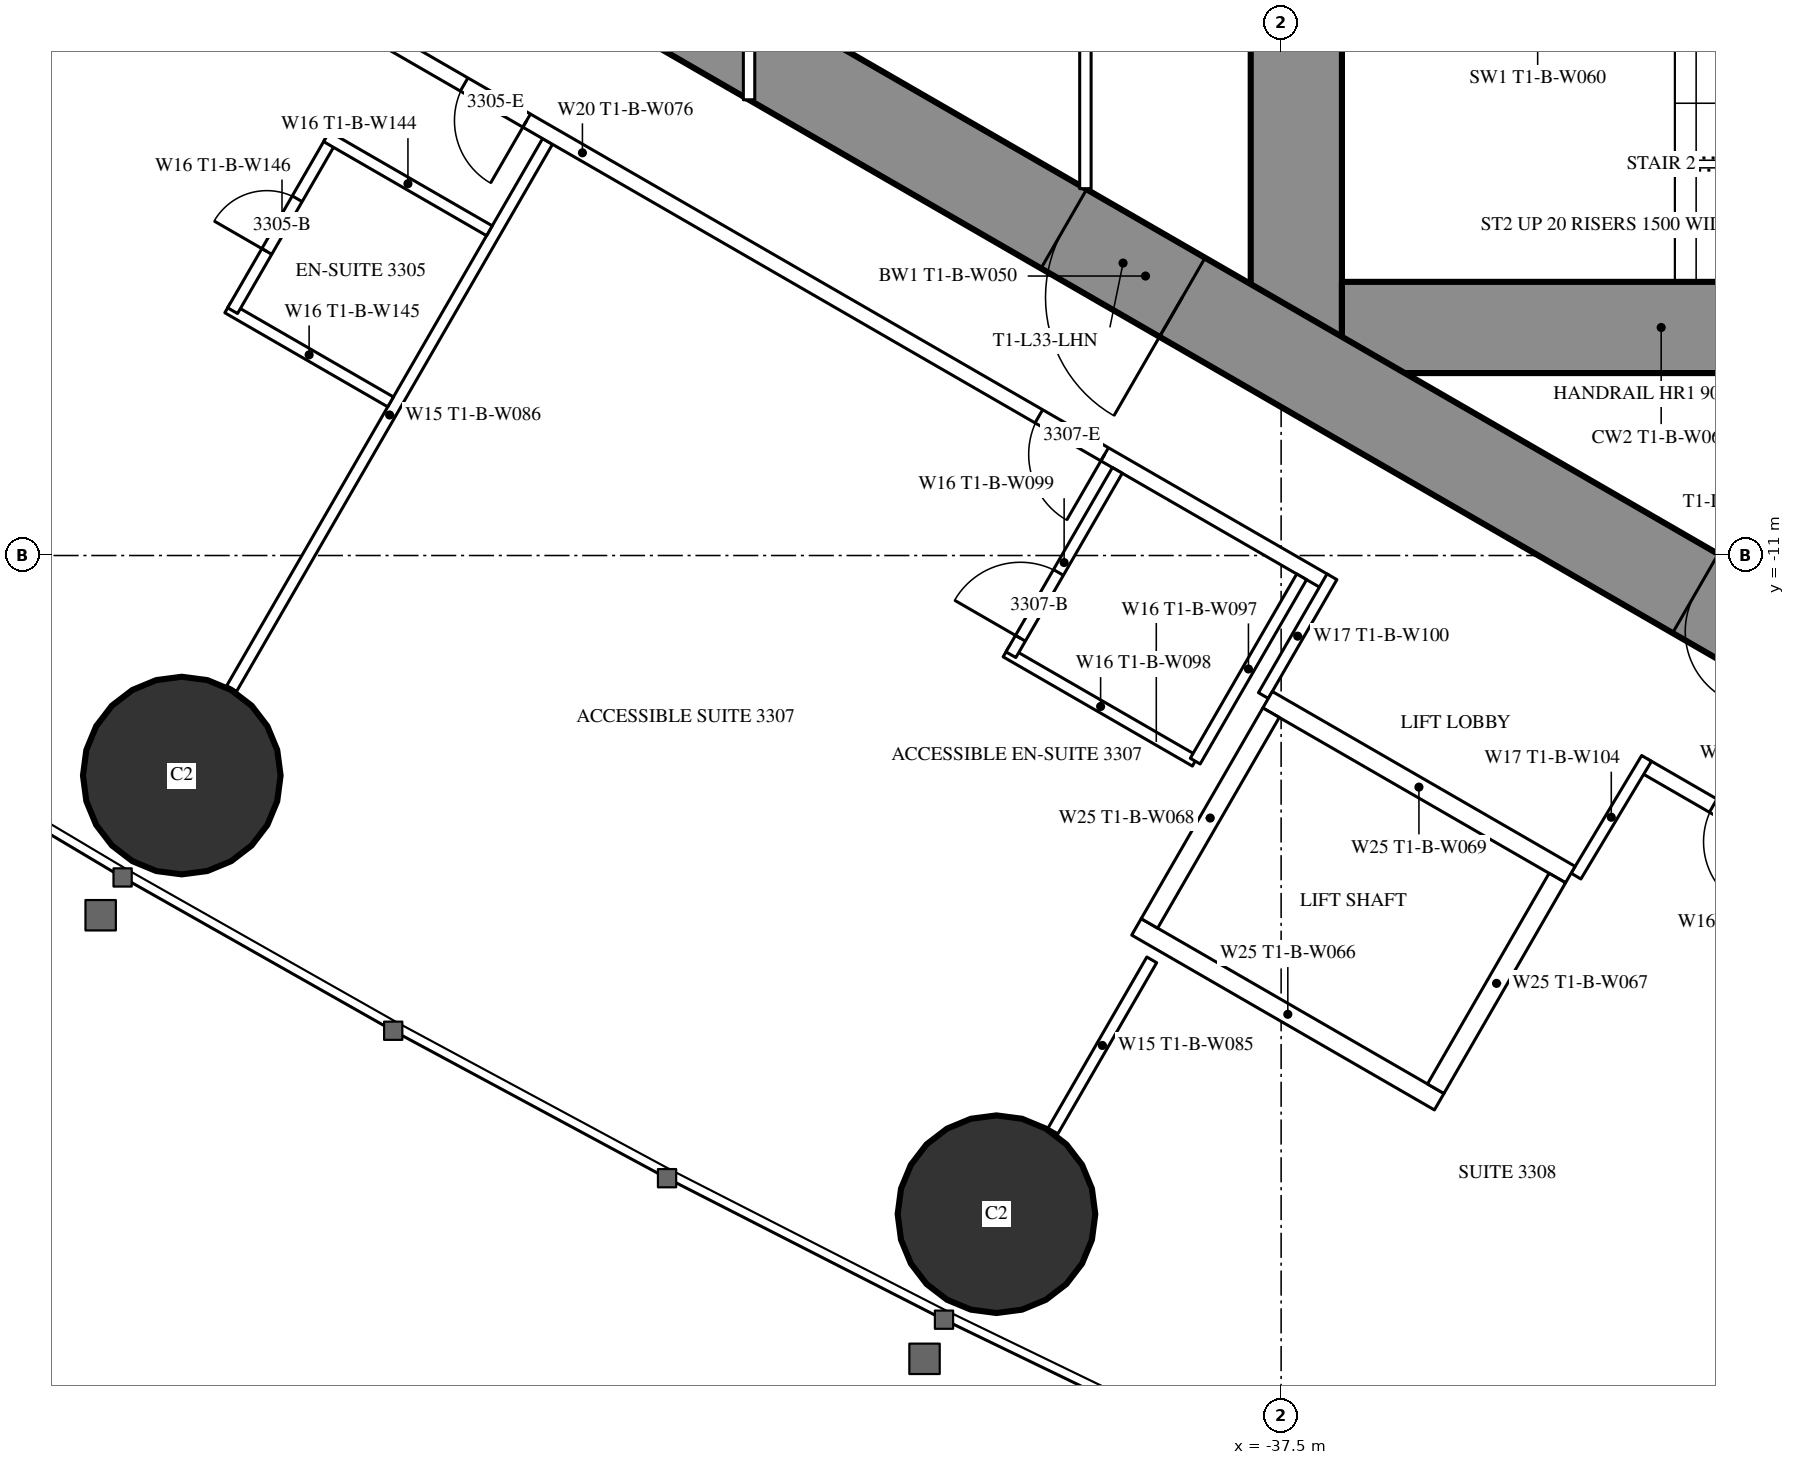
"""IFC4 building model, lengths in metres.
Left out: names, types, materials, properties, quantities, classifications, styles, units other than length and angle.
Written with IfcOpenShell. Run it as: python <this file> out.ifc"""

import sys

from ifc_helpers import new_model, si_unit, direction, frame, frame_2d, origin, origin_2d, place, context, subcontext, project, spatial, rectangle, hollow_circle, extrude, element, fill, save


model = new_model("IFC4")
c1 = context("Model", 3, precision=1e-05, world=origin(), true_north=direction((0.0, 1.0)))
c2 = subcontext(c1, "Body", "Model", "MODEL_VIEW")
j1 = project(units=[si_unit("LENGTHUNIT", "METRE"), si_unit("PLANEANGLEUNIT", "RADIAN")], contexts=[c1])
p1 = place(None, origin())
s1 = spatial("IfcSite", under=j1, at=p1, CompositionType="ELEMENT")
p2 = place(p1, origin())
s2 = spatial("IfcBuilding", under=s1, at=p2, CompositionType="ELEMENT")
p3 = place(p2, frame((0.0, 0.0, 125.6)))
s3 = spatial("IfcBuildingStorey", under=s2, at=p3, CompositionType="ELEMENT", Elevation=125.6)
for number, where, z_axis, x_axis in (
    (1, (-51.963, -13.895, 0.0), (0.0, 0.0, 1.0), (1.0, 0.0, 0.0)),
    (2, (-41.245, -19.666, 0.0), (0.0, 0.0, 1.0), (1.0, 0.0, 0.0)),
):
    element("IfcColumn", number, at=place(p3, frame(where, z_axis=z_axis, x_axis=x_axis)), inside=s3, PredefinedType="COLUMN", context=c2, shape_type="SweptSolid", body=[
        extrude(hollow_circle(Radius=1.3, WallThickness=0.1, at=origin_2d()), origin(), (0.0, 0.0, 1.0), 3.5),
    ])
p4 = place(p3, frame((-37.3, 8.6, 0.0), z_axis=(0.0, 0.0, 1.0), x_axis=(0.0, -1.0, 0.0)))
e3 = element("IfcWall", 3, at=p4, inside=s3, PredefinedType="SHEAR", context=c2, shape_type="SweptSolid", body=[
    extrude(rectangle(XDim=17.2, YDim=1.2, at=frame_2d((8.6, 0.0))), origin(), (0.0, 0.0, 1.0), 3.5),
])
p5 = place(p4, frame((7.7, 0.0, 0.0)))
e4 = element("IfcOpeningElement", 4, at=p5, cuts=e3, PredefinedType="OPENING", context=c2, shape_type="SweptSolid", body=[
    extrude(rectangle(XDim=1.8, YDim=2.2, at=frame_2d((0.9, 1.1))), frame((0.0, 0.61, 0.0), z_axis=(0.0, -1.0, 0.0), x_axis=(1.0, 0.0, 0.0)), (0.0, 0.0, 1.0), 1.22),
])
p6 = place(p3, frame((-28.3, -8.0, 0.0), z_axis=(0.0, 0.0, 1.0), x_axis=(-1.0, 0.0, 0.0)))
e5 = element("IfcWall", 5, at=p6, inside=s3, PredefinedType="SHEAR", context=c2, shape_type="SweptSolid", body=[
    extrude(rectangle(XDim=8.4, YDim=1.2, at=frame_2d((4.2, 0.0))), origin(), (0.0, 0.0, 1.0), 3.5),
])
p7 = place(p6, frame((0.25, 0.0, 0.0)))
e6 = element("IfcOpeningElement", 6, at=p7, cuts=e5, PredefinedType="OPENING", context=c2, shape_type="SweptSolid", body=[
    extrude(rectangle(XDim=1.0, YDim=2.2, at=frame_2d((0.5, 1.1))), frame((0.0, 0.61, 0.0), z_axis=(0.0, -1.0, 0.0), x_axis=(1.0, 0.0, 0.0)), (0.0, 0.0, 1.0), 1.22),
])
p8 = place(p3, frame((-27.2, -14.3, 0.0), z_axis=(0.0, 0.0, 1.0), x_axis=(-0.866024021859, 0.500002393557, 0.0)))
e7 = element("IfcWall", 7, at=p8, inside=s3, PredefinedType="SHEAR", context=c2, shape_type="SweptSolid", body=[
    extrude(rectangle(XDim=27.907, YDim=1.2, at=frame_2d((13.954, 0.0))), origin(), (0.0, 0.0, 1.0), 3.5),
])
p9 = place(p8, frame((4.6, 0.0, 0.0)))
e8 = element("IfcOpeningElement", 8, at=p9, cuts=e7, PredefinedType="OPENING", context=c2, shape_type="SweptSolid", body=[
    extrude(rectangle(XDim=1.0, YDim=2.2, at=frame_2d((0.5, 1.1))), frame((0.0, 0.61, 0.0), z_axis=(0.0, -1.0, 0.0), x_axis=(1.0, 0.0, 0.0)), (0.0, 0.0, 1.0), 1.22),
])
p10 = place(p8, frame((13.395, 0.0, 0.0)))
e9 = element("IfcOpeningElement", 9, at=p10, cuts=e7, PredefinedType="OPENING", context=c2, shape_type="SweptSolid", body=[
    extrude(rectangle(XDim=1.8, YDim=2.2, at=frame_2d((0.9, 1.1))), frame((0.0, 0.61, 0.0), z_axis=(0.0, -1.0, 0.0), x_axis=(1.0, 0.0, 0.0)), (0.0, 0.0, 1.0), 1.22),
])
p11 = place(p3, frame((-47.151, -5.552, 0.0), z_axis=(0.0, 0.0, 1.0), x_axis=(-0.500003012045, -0.866023664773, 0.0)))
e10 = element("IfcWall", 10, at=p11, inside=s3, PredefinedType="PARTITIONING", context=c2, shape_type="SweptSolid", body=[
    extrude(rectangle(XDim=8.311, YDim=0.15, at=frame_2d((4.156, 0.0))), origin(), (0.0, 0.0, 1.0), 2.2),
])
p12 = place(p3, frame((-39.202, -16.32, 0.0), z_axis=(0.0, 0.0, 1.0), x_axis=(-0.49997716683, -0.86603858612, 0.0)))
e11 = element("IfcWall", 11, at=p12, inside=s3, PredefinedType="PARTITIONING", context=c2, shape_type="SweptSolid", body=[
    extrude(rectangle(XDim=2.6, YDim=0.15, at=frame_2d((1.3, 0.0))), origin(), (0.0, 0.0, 1.0), 3.25),
])
p13 = place(p3, frame((-27.572, -16.741, 0.0), z_axis=(0.0, 0.0, 1.0), x_axis=(-0.866024464444, 0.500001626982, 0.0)))
e12 = element("IfcWall", 12, at=p13, inside=s3, PredefinedType="PARTITIONING", context=c2, shape_type="SweptSolid", body=[
    extrude(rectangle(XDim=5.955, YDim=0.2, at=frame_2d((2.978, 0.0))), origin(), (0.0, 0.0, 1.0), 3.25),
])
p14 = place(p13, frame((3.95, 0.0, 0.0)))
e13 = element("IfcOpeningElement", 13, at=p14, cuts=e12, PredefinedType="OPENING", context=c2, shape_type="SweptSolid", body=[
    extrude(rectangle(XDim=0.95, YDim=2.2, at=frame_2d((0.475, 1.1))), frame((0.0, 0.11, 0.0), z_axis=(0.0, -1.0, 0.0), x_axis=(1.0, 0.0, 0.0)), (0.0, 0.0, 1.0), 0.22),
])
p15 = place(p3, frame((-36.92, -11.344, 0.0), z_axis=(0.0, 0.0, 1.0), x_axis=(-0.866028313256, 0.499994960614, 0.0)))
e14 = element("IfcWall", 14, at=p15, inside=s3, PredefinedType="PARTITIONING", context=c2, shape_type="SweptSolid", body=[
    extrude(rectangle(XDim=22.568, YDim=0.2, at=frame_2d((11.284, 0.0))), origin(), (0.0, 0.0, 1.0), 3.25),
])
p16 = place(p15, frame((12.131, 0.0, 0.0)))
e15 = element("IfcOpeningElement", 15, at=p16, cuts=e14, PredefinedType="OPENING", context=c2, shape_type="SweptSolid", body=[
    extrude(rectangle(XDim=0.95, YDim=2.2, at=frame_2d((0.475, 1.1))), frame((0.0, 0.11, 0.0), z_axis=(0.0, -1.0, 0.0), x_axis=(1.0, 0.0, 0.0)), (0.0, 0.0, 1.0), 0.22),
])
p17 = place(p15, frame((3.35, 0.0, 0.0)))
e16 = element("IfcOpeningElement", 16, at=p17, cuts=e14, PredefinedType="OPENING", context=c2, shape_type="SweptSolid", body=[
    extrude(rectangle(XDim=1.0, YDim=2.2, at=frame_2d((0.5, 1.1))), frame((0.0, 0.11, 0.0), z_axis=(0.0, -1.0, 0.0), x_axis=(1.0, 0.0, 0.0)), (0.0, 0.0, 1.0), 0.22),
])
p18 = place(p3, frame((-36.831, -11.28, 0.0), z_axis=(0.0, 0.0, 1.0), x_axis=(-0.499937177781, -0.866061671171, 0.0)))
e17 = element("IfcWall", 17, at=p18, inside=s3, PredefinedType="PARTITIONING", context=c2, shape_type="SweptSolid", body=[
    extrude(rectangle(XDim=1.804, YDim=0.15, at=frame_2d((0.902, 0.0))), origin(), (0.0, 0.0, 1.0), 3.25),
])
p19 = place(p3, frame((-33.621, -15.218, 0.0), z_axis=(0.0, 0.0, 1.0), x_axis=(0.514336634837, 0.857588377991, 0.0)))
e18 = element("IfcWall", 18, at=p19, inside=s3, PredefinedType="PARTITIONING", context=c2, shape_type="SweptSolid", body=[
    extrude(rectangle(XDim=1.805, YDim=0.15, at=frame_2d((0.903, 0.0))), origin(), (0.0, 0.0, 1.0), 3.25),
])
p20 = place(p3, frame((-49.216, -8.979, 0.0), z_axis=(0.0, 0.0, 1.0), x_axis=(-0.866031185235, 0.4999899861, 0.0)))
e19 = element("IfcWall", 19, at=p20, inside=s3, PredefinedType="PARTITIONING", context=c2, shape_type="SweptSolid", body=[
    extrude(rectangle(XDim=2.475, YDim=0.15, at=frame_2d((1.238, 0.0))), origin(), (0.0, 0.0, 1.0), 3.25),
])
p21 = place(p3, frame((-49.995, -5.527, 0.0), z_axis=(0.0, 0.0, 1.0), x_axis=(-0.500006934395, -0.866021400173, 0.0)))
e20 = element("IfcWall", 20, at=p21, inside=s3, PredefinedType="PARTITIONING", context=c2, shape_type="SweptSolid", body=[
    extrude(rectangle(XDim=2.6, YDim=0.15, at=frame_2d((1.3, 0.0))), origin(), (0.0, 0.0, 1.0), 3.25),
])
p22 = place(p21, frame((0.9, 0.0, 0.0)))
e21 = element("IfcOpeningElement", 21, at=p22, cuts=e20, PredefinedType="OPENING", context=c2, shape_type="SweptSolid", body=[
    extrude(rectangle(XDim=0.8, YDim=2.2, at=frame_2d((0.4, 1.1))), frame((0.0, 0.085, 0.0), z_axis=(0.0, -1.0, 0.0), x_axis=(1.0, 0.0, 0.0)), (0.0, 0.0, 1.0), 0.17),
])
p23 = place(p3, frame((-47.916, -6.727, 0.0), z_axis=(0.0, 0.0, 1.0), x_axis=(-0.866031185235, 0.4999899861, 0.0)))
e22 = element("IfcWall", 22, at=p23, inside=s3, PredefinedType="PARTITIONING", context=c2, shape_type="SweptSolid", body=[
    extrude(rectangle(XDim=2.475, YDim=0.15, at=frame_2d((1.238, 0.0))), origin(), (0.0, 0.0, 1.0), 3.25),
])
p24 = place(p3, frame((-38.63, -13.705, 0.0), z_axis=(0.0, 0.0, 1.0), x_axis=(-0.866018712932, 0.500011588718, 0.0)))
e23 = element("IfcWall", 23, at=p24, inside=s3, PredefinedType="PARTITIONING", context=c2, shape_type="SweptSolid", body=[
    extrude(rectangle(XDim=2.875, YDim=0.15, at=frame_2d((1.438, 0.0))), origin(), (0.0, 0.0, 1.0), 3.25),
])
p25 = place(p3, frame((-39.655, -9.88, 0.0), z_axis=(0.0, 0.0, 1.0), x_axis=(-0.500049511043, -0.865996816683, 0.0)))
e24 = element("IfcWall", 24, at=p25, inside=s3, PredefinedType="PARTITIONING", context=c2, shape_type="SweptSolid", body=[
    extrude(rectangle(XDim=2.8, YDim=0.15, at=frame_2d((1.4, 0.0))), origin(), (0.0, 0.0, 1.0), 3.25),
])
p26 = place(p25, frame((1.55, 0.0, 0.0)))
e25 = element("IfcOpeningElement", 25, at=p26, cuts=e24, PredefinedType="OPENING", context=c2, shape_type="SweptSolid", body=[
    extrude(rectangle(XDim=1.0, YDim=2.2, at=frame_2d((0.5, 1.1))), frame((0.0, 0.085, 0.0), z_axis=(0.0, -1.0, 0.0), x_axis=(1.0, 0.0, 0.0)), (0.0, 0.0, 1.0), 0.17),
])
p27 = place(p3, frame((-37.23, -11.281, 0.0), z_axis=(0.0, 0.0, 1.0), x_axis=(-0.500049511043, -0.865996816683, 0.0)))
e26 = element("IfcWall", 26, at=p27, inside=s3, PredefinedType="PARTITIONING", context=c2, shape_type="SweptSolid", body=[
    extrude(rectangle(XDim=2.8, YDim=0.15, at=frame_2d((1.4, 0.0))), origin(), (0.0, 0.0, 1.0), 3.25),
])
p28 = place(p3, frame((-40.075, 1.2, 0.0), z_axis=(0.0, 0.0, 1.0), x_axis=(0.0, -1.0, 0.0)))
e27 = element("IfcWall", 27, at=p28, inside=s3, PredefinedType="PARTITIONING", context=c2, shape_type="SweptSolid", body=[
    extrude(rectangle(XDim=7.374, YDim=0.15, at=frame_2d((3.687, 0.0))), origin(), (0.0, 0.0, 1.0), 3.25),
])
p29 = place(p28, frame((2.787, 0.0, 0.0)))
e28 = element("IfcOpeningElement", 28, at=p29, cuts=e27, PredefinedType="OPENING", context=c2, shape_type="SweptSolid", body=[
    extrude(rectangle(XDim=1.8, YDim=2.2, at=frame_2d((0.9, 1.1))), frame((0.0, 0.085, 0.0), z_axis=(0.0, -1.0, 0.0), x_axis=(1.0, 0.0, 0.0)), (0.0, 0.0, 1.0), 0.17),
])
p30 = place(p3, frame((-44.5, 5.005, 0.0), z_axis=(0.0, 0.0, 1.0), x_axis=(0.0, -1.0, 0.0)))
e29 = element("IfcWall", 29, at=p30, inside=s3, PredefinedType="PARTITIONING", context=c2, shape_type="SweptSolid", body=[
    extrude(rectangle(XDim=10.009, YDim=0.15, at=frame_2d((5.005, 0.0))), origin(), (0.0, 0.0, 1.0), 2.45),
])
p31 = place(p30, frame((2.002, 0.0, 0.0)))
e30 = element("IfcOpeningElement", 30, at=p31, cuts=e29, PredefinedType="OPENING", context=c2, shape_type="SweptSolid", body=[
    extrude(rectangle(XDim=1.0, YDim=2.2, at=frame_2d((0.5, 1.1))), frame((0.0, 0.085, 0.0), z_axis=(0.0, -1.0, 0.0), x_axis=(1.0, 0.0, 0.0)), (0.0, 0.0, 1.0), 0.17),
])
p32 = place(p30, frame((7.007, 0.0, 0.0)))
e31 = element("IfcOpeningElement", 31, at=p32, cuts=e29, PredefinedType="OPENING", context=c2, shape_type="SweptSolid", body=[
    extrude(rectangle(XDim=1.0, YDim=2.2, at=frame_2d((0.5, 1.1))), frame((0.0, 0.085, 0.0), z_axis=(0.0, -1.0, 0.0), x_axis=(1.0, 0.0, 0.0)), (0.0, 0.0, 1.0), 0.17),
])
p33 = place(p3, frame((-33.696, -15.197, 0.0), z_axis=(0.0, 0.0, 1.0), x_axis=(-0.865976953817, 0.500083908417, 0.0)))
e32 = element("IfcWall", 32, at=p33, inside=s3, PredefinedType="PARTITIONING", context=c2, shape_type="SweptSolid", body=[
    extrude(rectangle(XDim=4.599, YDim=0.25, at=frame_2d((2.3, 0.0))), origin(), (0.0, 0.0, 1.0), 3.25),
])
p34 = place(p3, frame((-35.42, -18.186, 0.0), z_axis=(0.0, 0.0, 1.0), x_axis=(-0.865990227814, 0.50006092162, 0.0)))
e33 = element("IfcWall", 33, at=p34, inside=s3, PredefinedType="PARTITIONING", context=c2, shape_type="SweptSolid", body=[
    extrude(rectangle(XDim=4.6, YDim=0.25, at=frame_2d((2.3, 0.0))), origin(), (0.0, 0.0, 1.0), 3.25),
])
p35 = place(p3, frame((-33.866, -15.243, 0.0), z_axis=(0.0, 0.0, 1.0), x_axis=(-0.499929347863, -0.866066190972, 0.0)))
e34 = element("IfcWall", 34, at=p35, inside=s3, PredefinedType="PARTITIONING", context=c2, shape_type="SweptSolid", body=[
    extrude(rectangle(XDim=3.201, YDim=0.25, at=frame_2d((1.6, 0.0))), origin(), (0.0, 0.0, 1.0), 3.25),
])
p36 = place(p3, frame((-37.633, -13.068, 0.0), z_axis=(0.0, 0.0, 1.0), x_axis=(-0.499872130319, -0.866099216793, 0.0)))
e35 = element("IfcWall", 35, at=p36, inside=s3, PredefinedType="PARTITIONING", context=c2, shape_type="SweptSolid", body=[
    extrude(rectangle(XDim=3.2, YDim=0.25, at=frame_2d((1.6, 0.0))), origin(), (0.0, 0.0, 1.0), 3.25),
])
p37 = place(p22, origin())
e36 = element("IfcDoor", 36, at=p37, inside=s3, OperationType="SINGLE_SWING_RIGHT", PredefinedType="DOOR", context=c2, shape_type="SweptSolid", body=[
    extrude(rectangle(XDim=0.8, YDim=2.2, at=frame_2d((0.4, 1.1))), frame((0.0, 0.025, 0.0), z_axis=(0.0, -1.0, 0.0), x_axis=(1.0, 0.0, 0.0)), (0.0, 0.0, 1.0), 0.05),
])
fill(e21, e36)
p38 = place(p16, origin())
e37 = element("IfcDoor", 37, at=p38, inside=s3, OperationType="SINGLE_SWING_LEFT", PredefinedType="DOOR", context=c2, shape_type="SweptSolid", body=[
    extrude(rectangle(XDim=0.95, YDim=2.2, at=frame_2d((0.475, 1.1))), frame((0.0, 0.025, 0.0), z_axis=(0.0, -1.0, 0.0), x_axis=(1.0, 0.0, 0.0)), (0.0, 0.0, 1.0), 0.05),
])
fill(e15, e37)
p39 = place(p26, origin())
e38 = element("IfcDoor", 38, at=p39, inside=s3, OperationType="SINGLE_SWING_RIGHT", PredefinedType="DOOR", context=c2, shape_type="SweptSolid", body=[
    extrude(rectangle(XDim=1.0, YDim=2.2, at=frame_2d((0.5, 1.1))), frame((0.0, 0.025, 0.0), z_axis=(0.0, -1.0, 0.0), x_axis=(1.0, 0.0, 0.0)), (0.0, 0.0, 1.0), 0.05),
])
fill(e25, e38)
p40 = place(p17, origin())
e39 = element("IfcDoor", 39, at=p40, inside=s3, OperationType="SINGLE_SWING_LEFT", PredefinedType="DOOR", context=c2, shape_type="SweptSolid", body=[
    extrude(rectangle(XDim=1.0, YDim=2.2, at=frame_2d((0.5, 1.1))), frame((0.0, 0.025, 0.0), z_axis=(0.0, -1.0, 0.0), x_axis=(1.0, 0.0, 0.0)), (0.0, 0.0, 1.0), 0.05),
])
fill(e16, e39)
p41 = place(p14, origin())
e40 = element("IfcDoor", 40, at=p41, inside=s3, OperationType="SINGLE_SWING_LEFT", PredefinedType="DOOR", context=c2, shape_type="SweptSolid", body=[
    extrude(rectangle(XDim=0.95, YDim=2.2, at=frame_2d((0.475, 1.1))), frame((0.0, 0.025, 0.0), z_axis=(0.0, -1.0, 0.0), x_axis=(1.0, 0.0, 0.0)), (0.0, 0.0, 1.0), 0.05),
])
fill(e13, e40)
p42 = place(p9, origin())
e41 = element("IfcDoor", 41, at=p42, inside=s3, OperationType="SINGLE_SWING_LEFT", PredefinedType="DOOR", context=c2, shape_type="SweptSolid", body=[
    extrude(rectangle(XDim=1.0, YDim=2.2, at=frame_2d((0.5, 1.1))), frame((0.0, 0.025, 0.0), z_axis=(0.0, -1.0, 0.0), x_axis=(1.0, 0.0, 0.0)), (0.0, 0.0, 1.0), 0.05),
])
fill(e8, e41)
p43 = place(p10, origin())
e42 = element("IfcDoor", 42, at=p43, inside=s3, OperationType="DOUBLE_DOOR_SINGLE_SWING", PredefinedType="DOOR", context=c2, shape_type="SweptSolid", body=[
    extrude(rectangle(XDim=1.8, YDim=2.2, at=frame_2d((0.9, 1.1))), frame((0.0, 0.025, 0.0), z_axis=(0.0, -1.0, 0.0), x_axis=(1.0, 0.0, 0.0)), (0.0, 0.0, 1.0), 0.05),
])
fill(e9, e42)
save(model, sys.argv[1])
